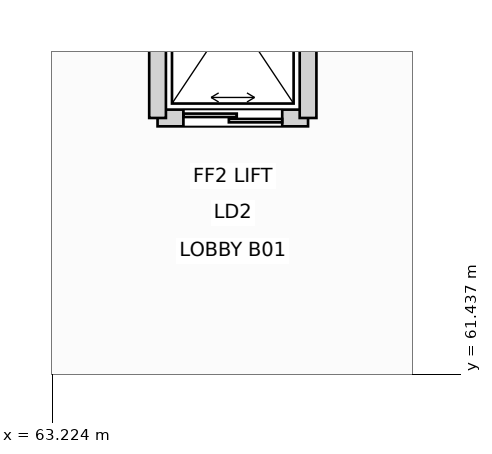
"""IFC4 building model, lengths in metres.
Left out: names, types, materials, properties, quantities, classifications, styles, units other than length and angle.
Written with IfcOpenShell. Run it as: python <this file> out.ifc"""

import sys

from ifc_helpers import new_model, si_unit, direction, frame, frame_2d, origin, place, context, subcontext, project, spatial, rectangle, extrude, element, fill, save


model = new_model("IFC4")
c1 = context("Model", 3, precision=1e-05, world=origin(), true_north=direction((0.0, 1.0)))
c2 = subcontext(c1, "Body", "Model", "MODEL_VIEW")
j1 = project(units=[si_unit("LENGTHUNIT", "METRE"), si_unit("PLANEANGLEUNIT", "RADIAN")], contexts=[c1])
p1 = place(None, origin())
s1 = spatial("IfcSite", under=j1, at=p1, CompositionType="ELEMENT")
p2 = place(p1, origin())
s2 = spatial("IfcBuilding", under=s1, at=p2, CompositionType="ELEMENT")
p3 = place(p2, frame((0.0, 0.0, -5.4)))
s3 = spatial("IfcBuildingStorey", under=s2, at=p3, CompositionType="ELEMENT", Elevation=-5.4)
p4 = place(p3, frame((64.61, 64.81, 0.0), z_axis=(0.0, 0.0, 1.0), x_axis=(1.0, 0.0, 0.0)))
e1 = element("IfcWall", 1, at=p4, inside=s3, PredefinedType="PARTITIONING", context=c2, shape_type="SweptSolid", body=[
    extrude(rectangle(XDim=1.98, YDim=0.22, at=frame_2d((0.99, 0.0))), origin(), (0.0, 0.0, 1.0), 5.045),
])
p5 = place(p4, frame((0.34, 0.0, 0.0)))
e2 = element("IfcOpeningElement", 2, at=p5, cuts=e1, PredefinedType="OPENING", context=c2, shape_type="SweptSolid", body=[
    extrude(rectangle(XDim=1.3, YDim=2.2, at=frame_2d((0.65, 1.1))), frame((0.0, 0.12, 0.0), z_axis=(0.0, -1.0, 0.0), x_axis=(1.0, 0.0, 0.0)), (0.0, 0.0, 1.0), 0.24),
])
for number, where, z_axis, x_axis in (
    (3, (64.61, 64.81, 0.0), (0.0, 0.0, 1.0), (0.0, 1.0, 0.0)),
    (4, (66.59, 64.81, 0.0), (0.0, 0.0, 1.0), (0.0, 1.0, 0.0)),
):
    element("IfcWall", number, at=place(p3, frame(where, z_axis=z_axis, x_axis=x_axis)), inside=s3, PredefinedType="PARTITIONING", context=c2, shape_type="SweptSolid", body=[
        extrude(rectangle(XDim=2.78, YDim=0.22, at=frame_2d((1.39, 0.0))), origin(), (0.0, 0.0, 1.0), 4.715),
    ])
p6 = place(p5, origin())
e5 = element("IfcDoor", 5, at=p6, inside=s3, OperationType="DOUBLE_DOOR_SLIDING", PredefinedType="DOOR", context=c2, shape_type="SweptSolid", body=[
    extrude(rectangle(XDim=1.3, YDim=2.2, at=frame_2d((0.65, 1.1))), frame((0.0, 0.025, 0.0), z_axis=(0.0, -1.0, 0.0), x_axis=(1.0, 0.0, 0.0)), (0.0, 0.0, 1.0), 0.05),
])
fill(e2, e5)
save(model, sys.argv[1])
